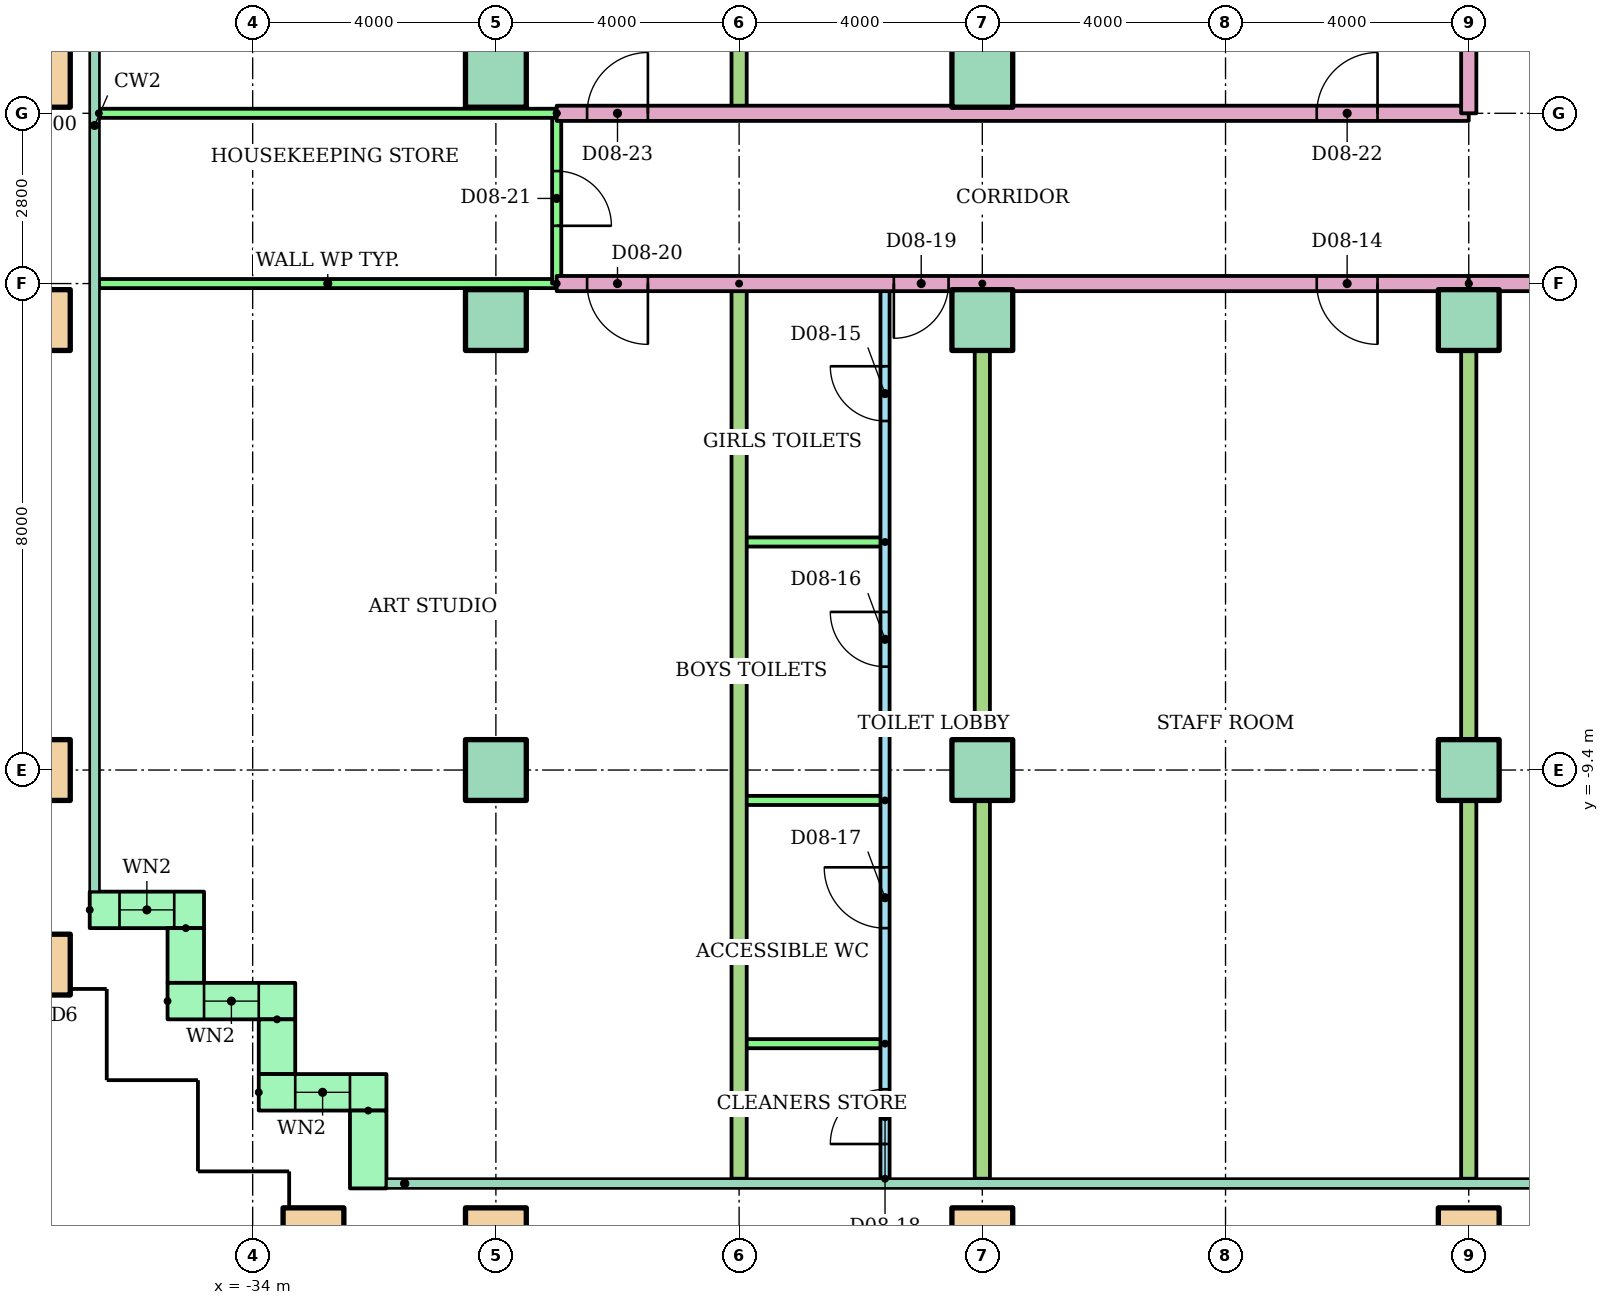
"""IFC4 building model, lengths in metres.
Left out: names, types, materials, properties, quantities, classifications, styles, units other than length and angle.
Written with IfcOpenShell. Run it as: python <this file> out.ifc"""

import sys

from ifc_helpers import new_model, si_unit, direction, frame, frame_2d, origin, origin_2d, place, context, subcontext, project, spatial, rectangle, hollow_rectangle, extrude, element, fill, save


model = new_model("IFC4")
c1 = context("Model", 3, precision=1e-05, world=origin(), true_north=direction((0.0, 1.0)))
c2 = subcontext(c1, "Body", "Model", "MODEL_VIEW")
j1 = project(units=[si_unit("LENGTHUNIT", "METRE"), si_unit("PLANEANGLEUNIT", "RADIAN")], contexts=[c1])
p1 = place(None, origin())
s1 = spatial("IfcSite", under=j1, at=p1, CompositionType="ELEMENT")
p2 = place(p1, origin())
s2 = spatial("IfcBuilding", under=s1, at=p2, CompositionType="ELEMENT")
p3 = place(p2, frame((0.0, 0.0, 33.8)))
s3 = spatial("IfcBuildingStorey", under=s2, at=p3, CompositionType="ELEMENT", Elevation=33.8)
for number, where in (
    (1, (-33.0, -17.1, 0.0)),
    (2, (-30.0, -17.1, 0.0)),
    (3, (-22.0, -17.1, 0.0)),
    (4, (-14.0, -17.1, 0.0)),
    (5, (-37.5, -12.6, 0.0)),
    (6, (-37.5, -9.4, 0.0)),
):
    element("IfcColumn", number, at=place(p3, frame(where)), inside=s3, PredefinedType="COLUMN", context=c2, shape_type="SweptSolid", body=[
        extrude(hollow_rectangle(XDim=1.0, YDim=1.0, WallThickness=0.05, at=origin_2d()), origin(), (0.0, 0.0, 1.0), 3.9),
    ])
for number, where in (
    (7, (-30.0, -9.4, 0.0)),
    (8, (-22.0, -9.4, 0.0)),
    (9, (-14.0, -9.4, 0.0)),
):
    element("IfcColumn", number, at=place(p3, frame(where)), inside=s3, PredefinedType="COLUMN", context=c2, shape_type="SweptSolid", body=[
        extrude(rectangle(XDim=1.0, YDim=1.0, at=origin_2d()), origin(), (0.0, 0.0, 1.0), 3.9),
    ])
p4 = place(p3, frame((-37.5, -2.0, 0.0)))
e10 = element("IfcColumn", 10, at=p4, inside=s3, PredefinedType="COLUMN", context=c2, shape_type="SweptSolid", body=[
    extrude(hollow_rectangle(XDim=1.0, YDim=1.0, WallThickness=0.05, at=origin_2d()), origin(), (0.0, 0.0, 1.0), 3.9),
])
for number, where in (
    (11, (-30.0, -2.0, 0.0)),
    (12, (-22.0, -2.0, 0.0)),
    (13, (-14.0, -2.0, 0.0)),
):
    element("IfcColumn", number, at=place(p3, frame(where)), inside=s3, PredefinedType="COLUMN", context=c2, shape_type="SweptSolid", body=[
        extrude(rectangle(XDim=1.0, YDim=1.0, at=origin_2d()), origin(), (0.0, 0.0, 1.0), 3.9),
    ])
p5 = place(p3, frame((-37.5, 2.0, 0.0)))
e14 = element("IfcColumn", 14, at=p5, inside=s3, PredefinedType="COLUMN", context=c2, shape_type="SweptSolid", body=[
    extrude(hollow_rectangle(XDim=1.0, YDim=1.0, WallThickness=0.05, at=origin_2d()), origin(), (0.0, 0.0, 1.0), 3.9),
])
for number, where in (
    (15, (-30.0, 2.0, 0.0)),
    (16, (-22.0, 2.0, 0.0)),
):
    element("IfcColumn", number, at=place(p3, frame(where)), inside=s3, PredefinedType="COLUMN", context=c2, shape_type="SweptSolid", body=[
        extrude(rectangle(XDim=1.0, YDim=1.0, at=origin_2d()), origin(), (0.0, 0.0, 1.0), 3.9),
    ])
p6 = place(p3, frame((-36.68, -11.7, 0.0)))
e17 = element("IfcWall", 17, at=p6, inside=s3, PredefinedType="STANDARD", context=c2, shape_type="SweptSolid", body=[
    extrude(rectangle(XDim=1.88, YDim=0.6, at=frame_2d((0.94, 0.0))), origin(), (0.0, 0.0, 1.0), 3.6),
])
p7 = place(p6, frame((0.49, 0.0, 0.9)))
e18 = element("IfcOpeningElement", 18, at=p7, cuts=e17, PredefinedType="OPENING", context=c2, shape_type="SweptSolid", body=[
    extrude(rectangle(XDim=0.9, YDim=1.8, at=frame_2d((0.45, 0.9))), frame((0.0, 0.31, 0.0), z_axis=(0.0, -1.0, 0.0), x_axis=(1.0, 0.0, 0.0)), (0.0, 0.0, 1.0), 0.62),
])
p8 = place(p3, frame((-35.1, -12.0, 0.0), z_axis=(0.0, 0.0, 1.0), x_axis=(0.0, -1.0, 0.0)))
e19 = element("IfcWall", 19, at=p8, inside=s3, PredefinedType="STANDARD", context=c2, shape_type="SweptSolid", body=[
    extrude(rectangle(XDim=0.9, YDim=0.6, at=frame_2d((0.45, 0.0))), origin(), (0.0, 0.0, 1.0), 3.6),
])
p9 = place(p3, frame((-35.4, -13.2, 0.0)))
e20 = element("IfcWall", 20, at=p9, inside=s3, PredefinedType="STANDARD", context=c2, shape_type="SweptSolid", body=[
    extrude(rectangle(XDim=2.1, YDim=0.6, at=frame_2d((1.05, 0.0))), origin(), (0.0, 0.0, 1.0), 3.6),
])
p10 = place(p9, frame((0.6, 0.0, 0.9)))
e21 = element("IfcOpeningElement", 21, at=p10, cuts=e20, PredefinedType="OPENING", context=c2, shape_type="SweptSolid", body=[
    extrude(rectangle(XDim=0.9, YDim=1.8, at=frame_2d((0.45, 0.9))), frame((0.0, 0.31, 0.0), z_axis=(0.0, -1.0, 0.0), x_axis=(1.0, 0.0, 0.0)), (0.0, 0.0, 1.0), 0.62),
])
p11 = place(p3, frame((-33.6, -13.5, 0.0), z_axis=(0.0, 0.0, 1.0), x_axis=(0.0, -1.0, 0.0)))
e22 = element("IfcWall", 22, at=p11, inside=s3, PredefinedType="STANDARD", context=c2, shape_type="SweptSolid", body=[
    extrude(rectangle(XDim=0.9, YDim=0.6, at=frame_2d((0.45, 0.0))), origin(), (0.0, 0.0, 1.0), 3.6),
])
p12 = place(p3, frame((-33.9, -14.7, 0.0)))
e23 = element("IfcWall", 23, at=p12, inside=s3, PredefinedType="STANDARD", context=c2, shape_type="SweptSolid", body=[
    extrude(rectangle(XDim=2.1, YDim=0.6, at=frame_2d((1.05, 0.0))), origin(), (0.0, 0.0, 1.0), 3.6),
])
p13 = place(p12, frame((0.6, 0.0, 0.9)))
e24 = element("IfcOpeningElement", 24, at=p13, cuts=e23, PredefinedType="OPENING", context=c2, shape_type="SweptSolid", body=[
    extrude(rectangle(XDim=0.9, YDim=1.8, at=frame_2d((0.45, 0.9))), frame((0.0, 0.31, 0.0), z_axis=(0.0, -1.0, 0.0), x_axis=(1.0, 0.0, 0.0)), (0.0, 0.0, 1.0), 0.62),
])
p14 = place(p3, frame((-32.1, -15.0, 0.0), z_axis=(0.0, 0.0, 1.0), x_axis=(0.0, -1.0, 0.0)))
e25 = element("IfcWall", 25, at=p14, inside=s3, PredefinedType="STANDARD", context=c2, shape_type="SweptSolid", body=[
    extrude(rectangle(XDim=1.28, YDim=0.6, at=frame_2d((0.64, 0.0))), origin(), (0.0, 0.0, 1.0), 3.6),
])
p15 = place(p3, frame((-14.0, -1.4, 0.0), z_axis=(0.0, 0.0, 1.0), x_axis=(-1.0, 0.0, 0.0)))
e26 = element("IfcWall", 26, at=p15, inside=s3, PredefinedType="PARTITIONING", context=c2, shape_type="SweptSolid", body=[
    extrude(rectangle(XDim=15.0, YDim=0.25, at=frame_2d((7.5, 0.0))), origin(), (0.0, 0.0, 1.0), 3.1),
])
p16 = place(p15, frame((1.5, 0.0, 0.0)))
e27 = element("IfcOpeningElement", 27, at=p16, cuts=e26, PredefinedType="OPENING", context=c2, shape_type="SweptSolid", body=[
    extrude(rectangle(XDim=1.0, YDim=2.1, at=frame_2d((0.5, 1.05))), frame((0.0, 0.135, 0.0), z_axis=(0.0, -1.0, 0.0), x_axis=(1.0, 0.0, 0.0)), (0.0, 0.0, 1.0), 0.27),
])
p17 = place(p15, frame((8.555, 0.0, 0.0)))
e28 = element("IfcOpeningElement", 28, at=p17, cuts=e26, PredefinedType="OPENING", context=c2, shape_type="SweptSolid", body=[
    extrude(rectangle(XDim=0.9, YDim=2.1, at=frame_2d((0.45, 1.05))), frame((0.0, 0.135, 0.0), z_axis=(0.0, -1.0, 0.0), x_axis=(1.0, 0.0, 0.0)), (0.0, 0.0, 1.0), 0.27),
])
p18 = place(p15, frame((13.5, 0.0, 0.0)))
e29 = element("IfcOpeningElement", 29, at=p18, cuts=e26, PredefinedType="OPENING", context=c2, shape_type="SweptSolid", body=[
    extrude(rectangle(XDim=1.0, YDim=2.1, at=frame_2d((0.5, 1.05))), frame((0.0, 0.135, 0.0), z_axis=(0.0, -1.0, 0.0), x_axis=(1.0, 0.0, 0.0)), (0.0, 0.0, 1.0), 0.27),
])
p19 = place(p3, frame((-29.0, -1.4, 0.0), z_axis=(0.0, 0.0, 1.0), x_axis=(-1.0, 0.0, 0.0)))
e30 = element("IfcWall", 30, at=p19, inside=s3, PredefinedType="PARTITIONING", context=c2, shape_type="SweptSolid", body=[
    extrude(rectangle(XDim=7.53, YDim=0.15, at=frame_2d((3.765, 0.0))), origin(), (0.0, 0.0, 1.0), 3.1),
])
p20 = place(p3, frame((-29.0, 1.4, 0.0), z_axis=(0.0, 0.0, 1.0), x_axis=(0.0, -1.0, 0.0)))
e31 = element("IfcWall", 31, at=p20, inside=s3, PredefinedType="PARTITIONING", context=c2, shape_type="SweptSolid", body=[
    extrude(rectangle(XDim=2.8, YDim=0.15, at=frame_2d((1.4, 0.0))), origin(), (0.0, 0.0, 1.0), 3.1),
])
p21 = place(p20, frame((0.95, 0.0, 0.0)))
e32 = element("IfcOpeningElement", 32, at=p21, cuts=e31, PredefinedType="OPENING", context=c2, shape_type="SweptSolid", body=[
    extrude(rectangle(XDim=0.9, YDim=2.1, at=frame_2d((0.45, 1.05))), frame((0.0, 0.085, 0.0), z_axis=(0.0, -1.0, 0.0), x_axis=(1.0, 0.0, 0.0)), (0.0, 0.0, 1.0), 0.17),
])
p22 = place(p3, frame((-23.6, -16.121, 0.0), z_axis=(0.0, 0.0, 1.0), x_axis=(0.0, 1.0, 0.0)))
e33 = element("IfcWall", 33, at=p22, inside=s3, PredefinedType="PARTITIONING", context=c2, shape_type="SweptSolid", body=[
    extrude(rectangle(XDim=14.721, YDim=0.15, at=frame_2d((7.361, 0.0))), origin(), (0.0, 0.0, 1.0), 3.1),
])
p23 = place(p22, frame((12.461, 0.0, 0.0)))
e34 = element("IfcOpeningElement", 34, at=p23, cuts=e33, PredefinedType="OPENING", context=c2, shape_type="SweptSolid", body=[
    extrude(rectangle(XDim=0.9, YDim=2.1, at=frame_2d((0.45, 1.05))), frame((0.0, 0.085, 0.0), z_axis=(0.0, -1.0, 0.0), x_axis=(1.0, 0.0, 0.0)), (0.0, 0.0, 1.0), 0.17),
])
p24 = place(p22, frame((8.421, 0.0, 0.0)))
e35 = element("IfcOpeningElement", 35, at=p24, cuts=e33, PredefinedType="OPENING", context=c2, shape_type="SweptSolid", body=[
    extrude(rectangle(XDim=0.9, YDim=2.1, at=frame_2d((0.45, 1.05))), frame((0.0, 0.085, 0.0), z_axis=(0.0, -1.0, 0.0), x_axis=(1.0, 0.0, 0.0)), (0.0, 0.0, 1.0), 0.17),
])
p25 = place(p22, frame((4.121, 0.0, 0.0)))
e36 = element("IfcOpeningElement", 36, at=p25, cuts=e33, PredefinedType="OPENING", context=c2, shape_type="SweptSolid", body=[
    extrude(rectangle(XDim=1.0, YDim=2.1, at=frame_2d((0.5, 1.05))), frame((0.0, 0.085, 0.0), z_axis=(0.0, -1.0, 0.0), x_axis=(1.0, 0.0, 0.0)), (0.0, 0.0, 1.0), 0.17),
])
p26 = place(p22, frame((0.571, 0.0, 0.0)))
e37 = element("IfcOpeningElement", 37, at=p26, cuts=e33, PredefinedType="OPENING", context=c2, shape_type="SweptSolid", body=[
    extrude(rectangle(XDim=0.9, YDim=2.1, at=frame_2d((0.45, 1.05))), frame((0.0, 0.085, 0.0), z_axis=(0.0, -1.0, 0.0), x_axis=(1.0, 0.0, 0.0)), (0.0, 0.0, 1.0), 0.17),
])
for number, where, z_axis, x_axis in (
    (38, (-23.6, -5.65, 0.0), (0.0, 0.0, 1.0), (-1.0, 0.0, 0.0)),
    (39, (-23.6, -9.9, 0.0), (0.0, 0.0, 1.0), (-1.0, 0.0, 0.0)),
    (40, (-23.6, -13.9, 0.0), (0.0, 0.0, 1.0), (-1.0, 0.0, 0.0)),
):
    element("IfcWall", number, at=place(p3, frame(where, z_axis=z_axis, x_axis=x_axis)), inside=s3, PredefinedType="PARTITIONING", context=c2, shape_type="SweptSolid", body=[
        extrude(rectangle(XDim=2.4, YDim=0.15, at=frame_2d((1.2, 0.0))), origin(), (0.0, 0.0, 1.0), 3.1),
    ])
for number, where, z_axis, x_axis in (
    (41, (-26.0, -1.4, 0.0), (0.0, 0.0, 1.0), (0.0, -1.0, 0.0)),
    (42, (-22.0, -1.4, 0.0), (0.0, 0.0, 1.0), (0.0, -1.0, 0.0)),
    (43, (-14.0, -1.4, 0.0), (0.0, 0.0, 1.0), (0.0, -1.0, 0.0)),
):
    element("IfcWall", number, at=place(p3, frame(where, z_axis=z_axis, x_axis=x_axis)), inside=s3, PredefinedType="PARTITIONING", context=c2, shape_type="SweptSolid", body=[
        extrude(rectangle(XDim=14.721, YDim=0.25, at=frame_2d((7.361, 0.0))), origin(), (0.0, 0.0, 1.0), 3.1),
    ])
p27 = place(p3, frame((-29.0, 1.4, 0.0)))
e44 = element("IfcWall", 44, at=p27, inside=s3, PredefinedType="PARTITIONING", context=c2, shape_type="SweptSolid", body=[
    extrude(rectangle(XDim=15.0, YDim=0.25, at=frame_2d((7.5, 0.0))), origin(), (0.0, 0.0, 1.0), 3.1),
])
p28 = place(p27, frame((12.5, 0.0, 0.0)))
e45 = element("IfcOpeningElement", 45, at=p28, cuts=e44, PredefinedType="OPENING", context=c2, shape_type="SweptSolid", body=[
    extrude(rectangle(XDim=1.0, YDim=2.1, at=frame_2d((0.5, 1.05))), frame((0.0, 0.135, 0.0), z_axis=(0.0, -1.0, 0.0), x_axis=(1.0, 0.0, 0.0)), (0.0, 0.0, 1.0), 0.27),
])
p29 = place(p27, frame((0.5, 0.0, 0.0)))
e46 = element("IfcOpeningElement", 46, at=p29, cuts=e44, PredefinedType="OPENING", context=c2, shape_type="SweptSolid", body=[
    extrude(rectangle(XDim=1.0, YDim=2.1, at=frame_2d((0.5, 1.05))), frame((0.0, 0.135, 0.0), z_axis=(0.0, -1.0, 0.0), x_axis=(1.0, 0.0, 0.0)), (0.0, 0.0, 1.0), 0.27),
])
p30 = place(p3, frame((-36.53, 1.4, 0.0)))
e47 = element("IfcWall", 47, at=p30, inside=s3, PredefinedType="PARTITIONING", context=c2, shape_type="SweptSolid", body=[
    extrude(rectangle(XDim=7.53, YDim=0.15, at=frame_2d((3.765, 0.0))), origin(), (0.0, 0.0, 1.0), 3.1),
])
p31 = place(p3, frame((-26.0, 18.521, 0.0), z_axis=(0.0, 0.0, 1.0), x_axis=(0.0, -1.0, 0.0)))
e48 = element("IfcWall", 48, at=p31, inside=s3, PredefinedType="PARTITIONING", context=c2, shape_type="SweptSolid", body=[
    extrude(rectangle(XDim=17.121, YDim=0.25, at=frame_2d((8.561, 0.0))), origin(), (0.0, 0.0, 1.0), 3.1),
])
p32 = place(p3, frame((14.0, -1.4, 0.0), z_axis=(0.0, 0.0, 1.0), x_axis=(-1.0, 0.0, 0.0)))
e49 = element("IfcWall", 49, at=p32, inside=s3, PredefinedType="PARTITIONING", context=c2, shape_type="SweptSolid", body=[
    extrude(rectangle(XDim=28.0, YDim=0.25, at=frame_2d((14.0, 0.0))), origin(), (0.0, 0.0, 1.0), 3.1),
])
p33 = place(p32, frame((17.5, 0.0, 0.0)))
e50 = element("IfcOpeningElement", 50, at=p33, cuts=e49, PredefinedType="OPENING", context=c2, shape_type="SweptSolid", body=[
    extrude(rectangle(XDim=1.0, YDim=2.1, at=frame_2d((0.5, 1.05))), frame((0.0, 0.135, 0.0), z_axis=(0.0, -1.0, 0.0), x_axis=(1.0, 0.0, 0.0)), (0.0, 0.0, 1.0), 0.27),
])
p34 = place(p32, frame((13.5, 0.0, 0.0)))
e51 = element("IfcOpeningElement", 51, at=p34, cuts=e49, PredefinedType="OPENING", context=c2, shape_type="SweptSolid", body=[
    extrude(rectangle(XDim=1.0, YDim=2.1, at=frame_2d((0.5, 1.05))), frame((0.0, 0.135, 0.0), z_axis=(0.0, -1.0, 0.0), x_axis=(1.0, 0.0, 0.0)), (0.0, 0.0, 1.0), 0.27),
])
p35 = place(p3, frame((-14.0, 3.0, 0.0), z_axis=(0.0, 0.0, 1.0), x_axis=(0.0, -1.0, 0.0)))
e52 = element("IfcWall", 52, at=p35, inside=s3, PredefinedType="PARTITIONING", context=c2, shape_type="SweptSolid", body=[
    extrude(rectangle(XDim=1.6, YDim=0.25, at=frame_2d((0.8, 0.0))), origin(), (0.0, 0.0, 1.0), 3.1),
])
p36 = place(p7, origin())
e53 = element("IfcWindow", 53, at=p36, inside=s3, PartitioningType="SINGLE_PANEL", PredefinedType="WINDOW", context=c2, shape_type="SweptSolid", body=[
    extrude(rectangle(XDim=0.9, YDim=1.8, at=frame_2d((0.45, 0.9))), frame((0.0, 0.03, 0.0), z_axis=(0.0, -1.0, 0.0), x_axis=(1.0, 0.0, 0.0)), (0.0, 0.0, 1.0), 0.06),
])
fill(e18, e53)
p37 = place(p10, origin())
e54 = element("IfcWindow", 54, at=p37, inside=s3, PartitioningType="SINGLE_PANEL", PredefinedType="WINDOW", context=c2, shape_type="SweptSolid", body=[
    extrude(rectangle(XDim=0.9, YDim=1.8, at=frame_2d((0.45, 0.9))), frame((0.0, 0.03, 0.0), z_axis=(0.0, -1.0, 0.0), x_axis=(1.0, 0.0, 0.0)), (0.0, 0.0, 1.0), 0.06),
])
fill(e21, e54)
p38 = place(p13, origin())
e55 = element("IfcWindow", 55, at=p38, inside=s3, PartitioningType="SINGLE_PANEL", PredefinedType="WINDOW", context=c2, shape_type="SweptSolid", body=[
    extrude(rectangle(XDim=0.9, YDim=1.8, at=frame_2d((0.45, 0.9))), frame((0.0, 0.03, 0.0), z_axis=(0.0, -1.0, 0.0), x_axis=(1.0, 0.0, 0.0)), (0.0, 0.0, 1.0), 0.06),
])
fill(e24, e55)
p39 = place(p16, origin())
e56 = element("IfcDoor", 56, at=p39, inside=s3, OperationType="SINGLE_SWING_LEFT", PredefinedType="DOOR", context=c2, shape_type="SweptSolid", body=[
    extrude(rectangle(XDim=1.0, YDim=2.1, at=frame_2d((0.5, 1.05))), frame((0.0, 0.025, 0.0), z_axis=(0.0, -1.0, 0.0), x_axis=(1.0, 0.0, 0.0)), (0.0, 0.0, 1.0), 0.05),
])
fill(e27, e56)
p40 = place(p23, origin())
e57 = element("IfcDoor", 57, at=p40, inside=s3, OperationType="SINGLE_SWING_RIGHT", PredefinedType="DOOR", context=c2, shape_type="SweptSolid", body=[
    extrude(rectangle(XDim=0.9, YDim=2.1, at=frame_2d((0.45, 1.05))), frame((0.0, 0.025, 0.0), z_axis=(0.0, -1.0, 0.0), x_axis=(1.0, 0.0, 0.0)), (0.0, 0.0, 1.0), 0.05),
])
fill(e34, e57)
p41 = place(p24, origin())
e58 = element("IfcDoor", 58, at=p41, inside=s3, OperationType="SINGLE_SWING_RIGHT", PredefinedType="DOOR", context=c2, shape_type="SweptSolid", body=[
    extrude(rectangle(XDim=0.9, YDim=2.1, at=frame_2d((0.45, 1.05))), frame((0.0, 0.025, 0.0), z_axis=(0.0, -1.0, 0.0), x_axis=(1.0, 0.0, 0.0)), (0.0, 0.0, 1.0), 0.05),
])
fill(e35, e58)
p42 = place(p25, origin())
e59 = element("IfcDoor", 59, at=p42, inside=s3, OperationType="SINGLE_SWING_RIGHT", PredefinedType="DOOR", context=c2, shape_type="SweptSolid", body=[
    extrude(rectangle(XDim=1.0, YDim=2.1, at=frame_2d((0.5, 1.05))), frame((0.0, 0.025, 0.0), z_axis=(0.0, -1.0, 0.0), x_axis=(1.0, 0.0, 0.0)), (0.0, 0.0, 1.0), 0.05),
])
fill(e36, e59)
p43 = place(p26, origin())
e60 = element("IfcDoor", 60, at=p43, inside=s3, OperationType="SINGLE_SWING_LEFT", PredefinedType="DOOR", context=c2, shape_type="SweptSolid", body=[
    extrude(rectangle(XDim=0.9, YDim=2.1, at=frame_2d((0.45, 1.05))), frame((0.0, 0.025, 0.0), z_axis=(0.0, -1.0, 0.0), x_axis=(1.0, 0.0, 0.0)), (0.0, 0.0, 1.0), 0.05),
])
fill(e37, e60)
p44 = place(p17, origin())
e61 = element("IfcDoor", 61, at=p44, inside=s3, OperationType="SINGLE_SWING_RIGHT", PredefinedType="DOOR", context=c2, shape_type="SweptSolid", body=[
    extrude(rectangle(XDim=0.9, YDim=2.1, at=frame_2d((0.45, 1.05))), frame((0.0, 0.025, 0.0), z_axis=(0.0, -1.0, 0.0), x_axis=(1.0, 0.0, 0.0)), (0.0, 0.0, 1.0), 0.05),
])
fill(e28, e61)
p45 = place(p18, origin())
e62 = element("IfcDoor", 62, at=p45, inside=s3, OperationType="SINGLE_SWING_LEFT", PredefinedType="DOOR", context=c2, shape_type="SweptSolid", body=[
    extrude(rectangle(XDim=1.0, YDim=2.1, at=frame_2d((0.5, 1.05))), frame((0.0, 0.025, 0.0), z_axis=(0.0, -1.0, 0.0), x_axis=(1.0, 0.0, 0.0)), (0.0, 0.0, 1.0), 0.05),
])
fill(e29, e62)
p46 = place(p21, origin())
e63 = element("IfcDoor", 63, at=p46, inside=s3, OperationType="SINGLE_SWING_RIGHT", PredefinedType="DOOR", context=c2, shape_type="SweptSolid", body=[
    extrude(rectangle(XDim=0.9, YDim=2.1, at=frame_2d((0.45, 1.05))), frame((0.0, 0.025, 0.0), z_axis=(0.0, -1.0, 0.0), x_axis=(1.0, 0.0, 0.0)), (0.0, 0.0, 1.0), 0.05),
])
fill(e32, e63)
p47 = place(p28, origin())
e64 = element("IfcDoor", 64, at=p47, inside=s3, OperationType="SINGLE_SWING_RIGHT", PredefinedType="DOOR", context=c2, shape_type="SweptSolid", body=[
    extrude(rectangle(XDim=1.0, YDim=2.1, at=frame_2d((0.5, 1.05))), frame((0.0, 0.025, 0.0), z_axis=(0.0, -1.0, 0.0), x_axis=(1.0, 0.0, 0.0)), (0.0, 0.0, 1.0), 0.05),
])
fill(e45, e64)
p48 = place(p29, origin())
e65 = element("IfcDoor", 65, at=p48, inside=s3, OperationType="SINGLE_SWING_RIGHT", PredefinedType="DOOR", context=c2, shape_type="SweptSolid", body=[
    extrude(rectangle(XDim=1.0, YDim=2.1, at=frame_2d((0.5, 1.05))), frame((0.0, 0.025, 0.0), z_axis=(0.0, -1.0, 0.0), x_axis=(1.0, 0.0, 0.0)), (0.0, 0.0, 1.0), 0.05),
])
fill(e46, e65)
save(model, sys.argv[1])
